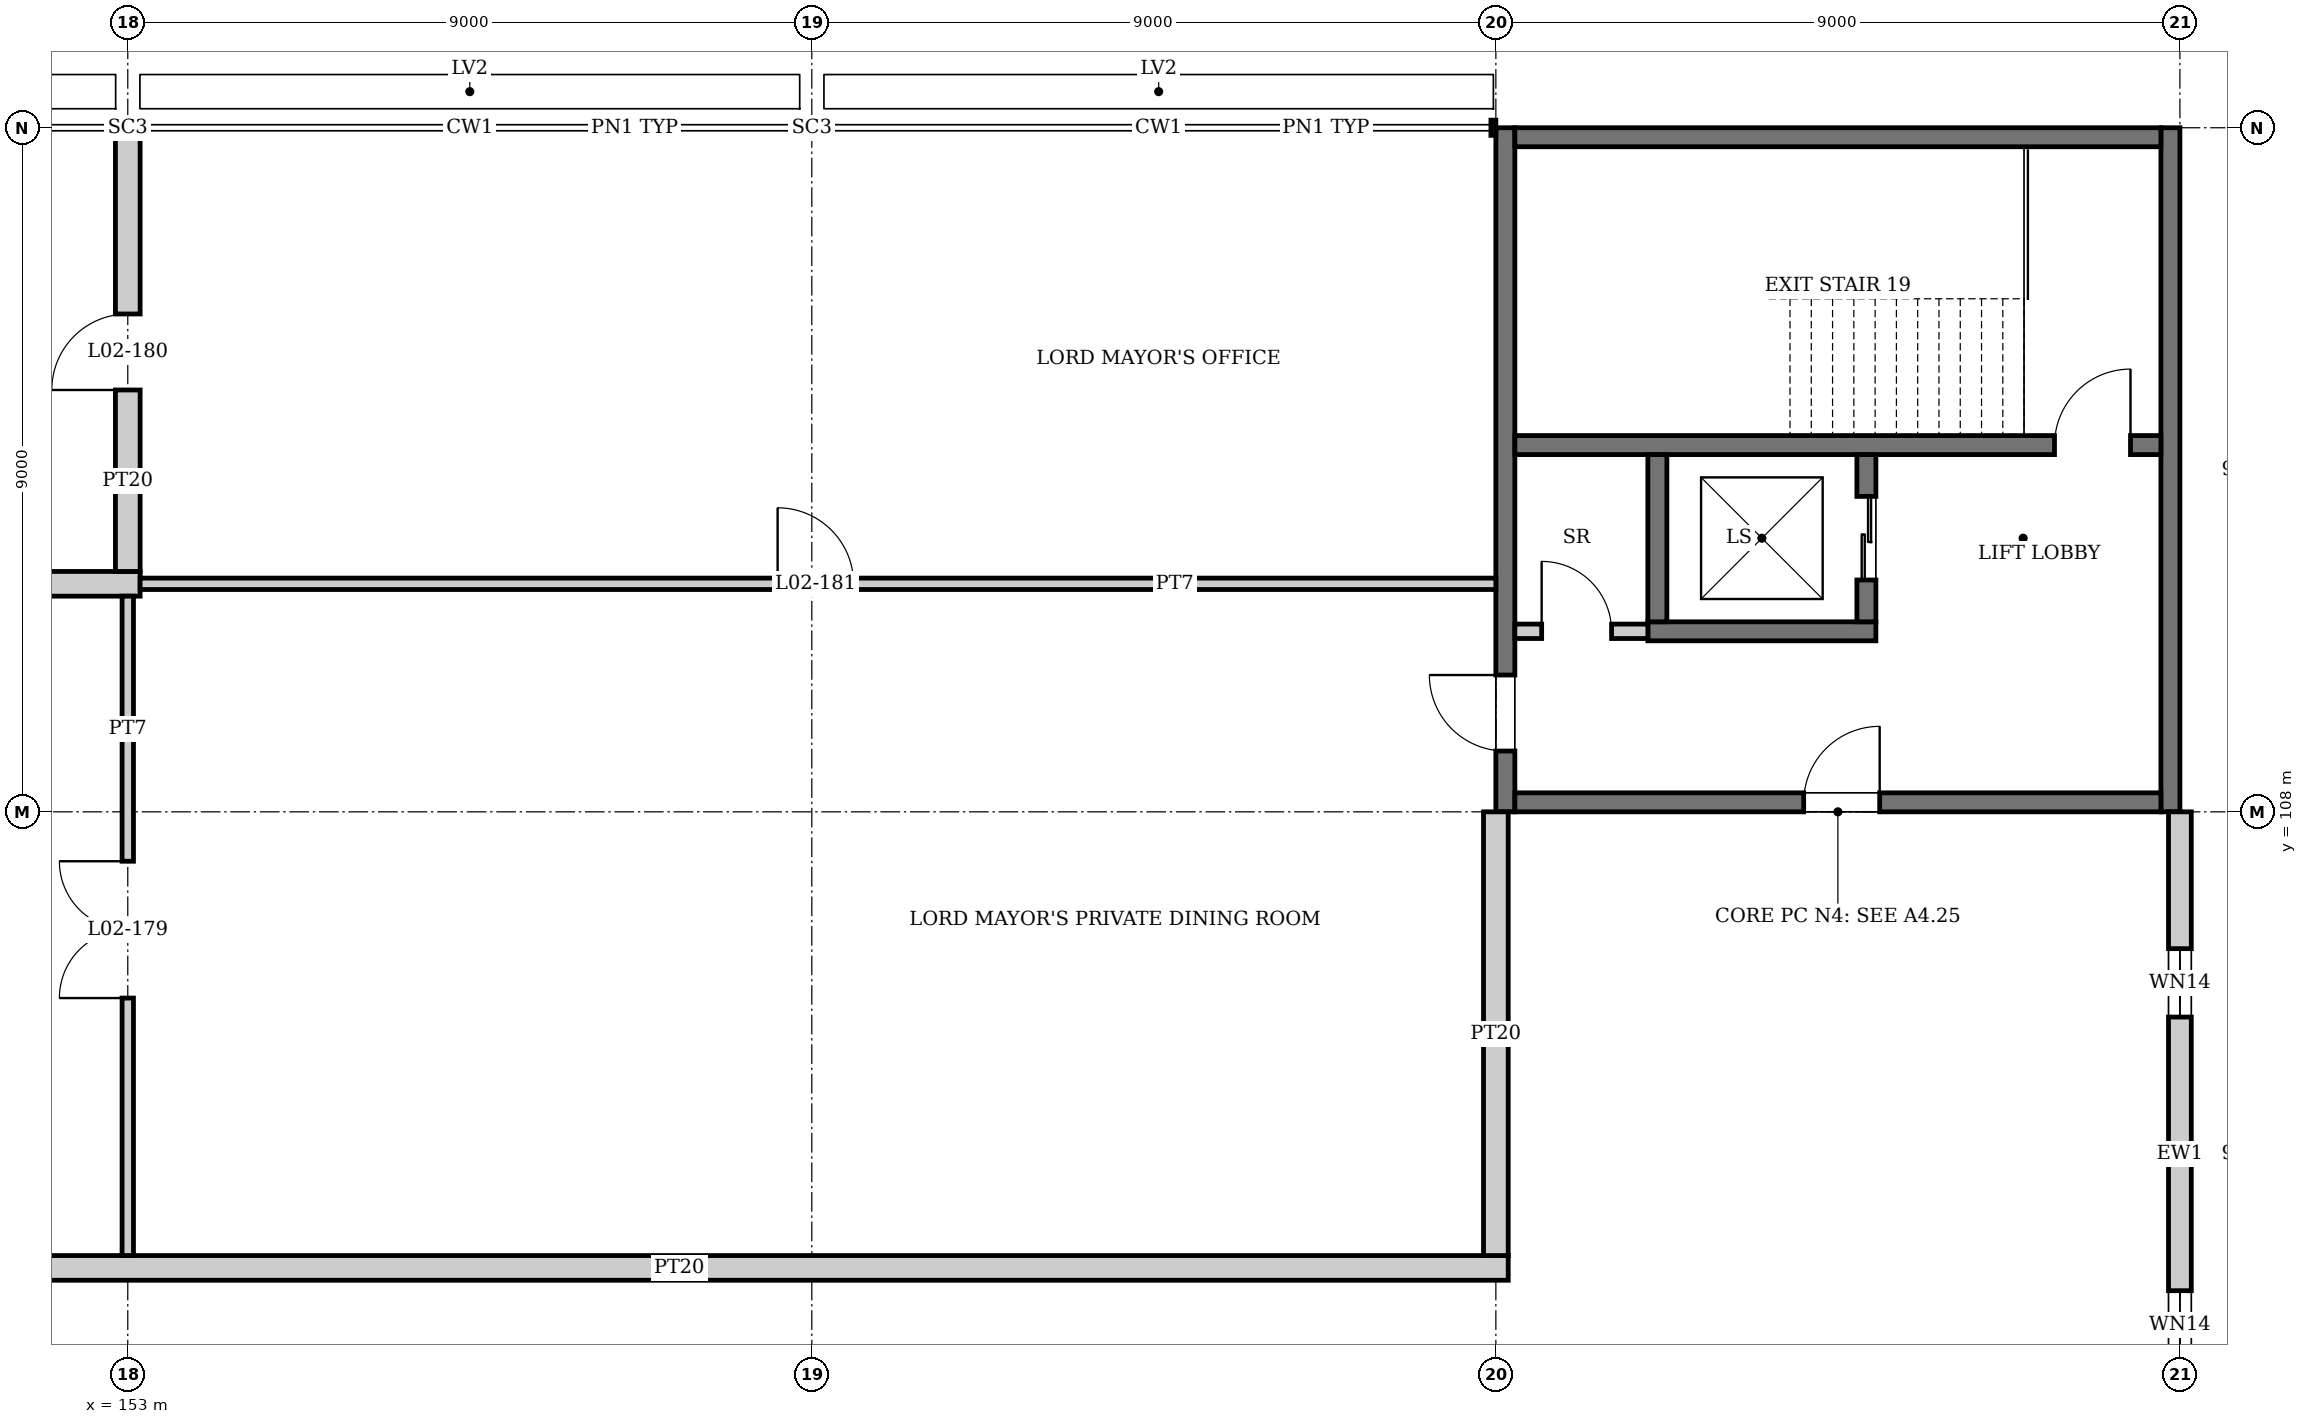
"""IFC4 building model, lengths in metres.
Left out: names, types, materials, properties, quantities, classifications, styles, units other than length and angle.
Written with IfcOpenShell. Run it as: python <this file> out.ifc"""

import sys

from ifc_helpers import new_model, si_unit, direction, frame, frame_2d, origin, origin_2d, place, context, subcontext, project, spatial, rectangle, i_section, extrude, element, fill, save


model = new_model("IFC4")
c1 = context("Model", 3, precision=1e-05, world=origin(), true_north=direction((0.0, 1.0)))
c2 = subcontext(c1, "Body", "Model", "MODEL_VIEW")
j1 = project(units=[si_unit("LENGTHUNIT", "METRE"), si_unit("PLANEANGLEUNIT", "RADIAN")], contexts=[c1])
p1 = place(None, origin())
s1 = spatial("IfcSite", under=j1, at=p1, CompositionType="ELEMENT")
p2 = place(p1, origin())
s2 = spatial("IfcBuilding", under=s1, at=p2, CompositionType="ELEMENT")
p3 = place(p2, frame((0.0, 0.0, 10.5)))
s3 = spatial("IfcBuildingStorey", under=s2, at=p3, CompositionType="ELEMENT", Elevation=10.5)
for number, where, z_axis, x_axis in (
    (1, (153.0, 117.0, 0.0), (0.0, 0.0, 1.0), (0.0, 1.0, 0.0)),
    (2, (162.0, 117.0, 0.0), (0.0, 0.0, 1.0), (0.0, 1.0, 0.0)),
):
    element("IfcColumn", number, at=place(p3, frame(where, z_axis=z_axis, x_axis=x_axis)), inside=s3, PredefinedType="COLUMN", context=c2, shape_type="SweptSolid", body=[
        extrude(i_section(OverallWidth=0.254, OverallDepth=0.254, WebThickness=0.009, FlangeThickness=0.014, at=origin_2d()), origin(), (0.0, 0.0, 1.0), 4.5),
    ])
p4 = place(p3, frame((171.125, 108.0, 0.0), z_axis=(0.0, 0.0, 1.0), x_axis=(0.0, 1.0, 0.0)))
e3 = element("IfcWall", 3, at=p4, inside=s3, PredefinedType="SHEAR", context=c2, shape_type="SweptSolid", body=[
    extrude(rectangle(XDim=9.0, YDim=0.25, at=frame_2d((4.5, 0.0))), origin(), (0.0, 0.0, 1.0), 4.35),
])
p5 = place(p4, frame((0.8, 0.0, 0.0)))
e4 = element("IfcOpeningElement", 4, at=p5, cuts=e3, PredefinedType="OPENING", context=c2, shape_type="SweptSolid", body=[
    extrude(rectangle(XDim=1.0, YDim=2.1, at=frame_2d((0.5, 1.05))), frame((0.0, 0.135, 0.0), z_axis=(0.0, -1.0, 0.0), x_axis=(1.0, 0.0, 0.0)), (0.0, 0.0, 1.0), 0.27),
])
p6 = place(p3, frame((179.875, 108.0, 0.0), z_axis=(0.0, 0.0, 1.0), x_axis=(0.0, 1.0, 0.0)))
e5 = element("IfcWall", 5, at=p6, inside=s3, PredefinedType="SHEAR", context=c2, shape_type="SweptSolid", body=[
    extrude(rectangle(XDim=9.0, YDim=0.25, at=frame_2d((4.5, 0.0))), origin(), (0.0, 0.0, 1.0), 4.35),
])
p7 = place(p3, frame((171.25, 108.125, 0.0), z_axis=(0.0, 0.0, 1.0), x_axis=(1.0, 0.0, 0.0)))
e6 = element("IfcWall", 6, at=p7, inside=s3, PredefinedType="SHEAR", context=c2, shape_type="SweptSolid", body=[
    extrude(rectangle(XDim=8.5, YDim=0.25, at=frame_2d((4.25, 0.0))), origin(), (0.0, 0.0, 1.0), 4.35),
])
p8 = place(p7, frame((3.8, 0.0, 0.0)))
e7 = element("IfcOpeningElement", 7, at=p8, cuts=e6, PredefinedType="OPENING", context=c2, shape_type="SweptSolid", body=[
    extrude(rectangle(XDim=1.0, YDim=2.1, at=frame_2d((0.5, 1.05))), frame((0.0, 0.135, 0.0), z_axis=(0.0, -1.0, 0.0), x_axis=(1.0, 0.0, 0.0)), (0.0, 0.0, 1.0), 0.27),
])
p9 = place(p3, frame((171.25, 116.875, 0.0), z_axis=(0.0, 0.0, 1.0), x_axis=(1.0, 0.0, 0.0)))
e8 = element("IfcWall", 8, at=p9, inside=s3, PredefinedType="SHEAR", context=c2, shape_type="SweptSolid", body=[
    extrude(rectangle(XDim=8.5, YDim=0.25, at=frame_2d((4.25, 0.0))), origin(), (0.0, 0.0, 1.0), 4.35),
])
p10 = place(p3, frame((180.0, 99.127, 0.0), z_axis=(0.0, 0.0, 1.0), x_axis=(0.0, 1.0, 0.0)))
e9 = element("IfcWall", 9, at=p10, inside=s3, PredefinedType="SOLIDWALL", context=c2, shape_type="SweptSolid", body=[
    extrude(rectangle(XDim=8.873, YDim=0.3, at=frame_2d((4.437, 0.0))), origin(), (0.0, 0.0, 1.0), 3.991),
])
p11 = place(p10, frame((1.673, 0.0, 0.6)))
e10 = element("IfcOpeningElement", 10, at=p11, cuts=e9, PredefinedType="OPENING", context=c2, shape_type="SweptSolid", body=[
    extrude(rectangle(XDim=0.9, YDim=2.7, at=frame_2d((0.45, 1.35))), frame((0.0, 0.16, 0.0), z_axis=(0.0, -1.0, 0.0), x_axis=(1.0, 0.0, 0.0)), (0.0, 0.0, 1.0), 0.32),
])
p12 = place(p10, frame((6.173, 0.0, 0.6)))
e11 = element("IfcOpeningElement", 11, at=p12, cuts=e9, PredefinedType="OPENING", context=c2, shape_type="SweptSolid", body=[
    extrude(rectangle(XDim=0.9, YDim=2.7, at=frame_2d((0.45, 1.35))), frame((0.0, 0.16, 0.0), z_axis=(0.0, -1.0, 0.0), x_axis=(1.0, 0.0, 0.0)), (0.0, 0.0, 1.0), 0.32),
])
p13 = place(p3, frame((179.75, 112.825, 0.0), z_axis=(0.0, 0.0, 1.0), x_axis=(-1.0, 0.0, 0.0)))
e12 = element("IfcWall", 12, at=p13, inside=s3, PredefinedType="SOLIDWALL", context=c2, shape_type="SweptSolid", body=[
    extrude(rectangle(XDim=8.5, YDim=0.25, at=frame_2d((4.25, 0.0))), origin(), (0.0, 0.0, 1.0), 4.35),
])
p14 = place(p13, frame((0.4, 0.0, 0.0)))
e13 = element("IfcOpeningElement", 13, at=p14, cuts=e12, PredefinedType="OPENING", context=c2, shape_type="SweptSolid", body=[
    extrude(rectangle(XDim=1.0, YDim=2.1, at=frame_2d((0.5, 1.05))), frame((0.0, 0.135, 0.0), z_axis=(0.0, -1.0, 0.0), x_axis=(1.0, 0.0, 0.0)), (0.0, 0.0, 1.0), 0.27),
])
p15 = place(p3, frame((173.0, 110.375, 0.0), z_axis=(0.0, 0.0, 1.0), x_axis=(1.0, 0.0, 0.0)))
e14 = element("IfcWall", 14, at=p15, inside=s3, PredefinedType="SOLIDWALL", context=c2, shape_type="SweptSolid", body=[
    extrude(rectangle(XDim=3.0, YDim=0.25, at=frame_2d((1.5, 0.0))), origin(), (0.0, 0.0, 1.0), 4.35),
])
p16 = place(p3, frame((173.125, 110.5, 0.0), z_axis=(0.0, 0.0, 1.0), x_axis=(0.0, 1.0, 0.0)))
e15 = element("IfcWall", 15, at=p16, inside=s3, PredefinedType="SOLIDWALL", context=c2, shape_type="SweptSolid", body=[
    extrude(rectangle(XDim=2.2, YDim=0.25, at=frame_2d((1.1, 0.0))), origin(), (0.0, 0.0, 1.0), 4.35),
])
p17 = place(p3, frame((175.875, 110.5, 0.0), z_axis=(0.0, 0.0, 1.0), x_axis=(0.0, 1.0, 0.0)))
e16 = element("IfcWall", 16, at=p17, inside=s3, PredefinedType="SOLIDWALL", context=c2, shape_type="SweptSolid", body=[
    extrude(rectangle(XDim=2.2, YDim=0.25, at=frame_2d((1.1, 0.0))), origin(), (0.0, 0.0, 1.0), 4.35),
])
p18 = place(p17, frame((0.55, 0.0, 0.0)))
e17 = element("IfcOpeningElement", 17, at=p18, cuts=e16, PredefinedType="OPENING", context=c2, shape_type="SweptSolid", body=[
    extrude(rectangle(XDim=1.1, YDim=2.1, at=frame_2d((0.55, 1.05))), frame((0.0, 0.135, 0.0), z_axis=(0.0, -1.0, 0.0), x_axis=(1.0, 0.0, 0.0)), (0.0, 0.0, 1.0), 0.27),
])
p19 = place(p3, frame((143.837, 102.0, 0.0), z_axis=(0.0, 0.0, 1.0), x_axis=(1.0, 0.0, 0.0)))
e18 = element("IfcWall", 18, at=p19, inside=s3, PredefinedType="PARTITIONING", context=c2, shape_type="SweptSolid", body=[
    extrude(rectangle(XDim=27.325, YDim=0.325, at=frame_2d((13.663, 0.0))), origin(), (0.0, 0.0, 1.0), 3.65),
])
p20 = place(p19, frame((3.712, 0.0, 0.0)))
e19 = element("IfcOpeningElement", 19, at=p20, cuts=e18, PredefinedType="OPENING", context=c2, shape_type="SweptSolid", body=[
    extrude(rectangle(XDim=1.8, YDim=2.4, at=frame_2d((0.9, 1.2))), frame((0.0, 0.172, 0.0), z_axis=(0.0, -1.0, 0.0), x_axis=(1.0, 0.0, 0.0)), (0.0, 0.0, 1.0), 0.345),
])
p21 = place(p3, frame((171.25, 110.375, 0.0), z_axis=(0.0, 0.0, 1.0), x_axis=(1.0, 0.0, 0.0)))
e20 = element("IfcWall", 20, at=p21, inside=s3, PredefinedType="PARTITIONING", context=c2, shape_type="SweptSolid", body=[
    extrude(rectangle(XDim=1.75, YDim=0.19, at=frame_2d((0.875, 0.0))), origin(), (0.0, 0.0, 1.0), 4.35),
])
p22 = place(p21, frame((0.353, 0.0, 0.0)))
e21 = element("IfcOpeningElement", 21, at=p22, cuts=e20, PredefinedType="OPENING", context=c2, shape_type="SweptSolid", body=[
    extrude(rectangle(XDim=0.92, YDim=2.1, at=frame_2d((0.46, 1.05))), frame((0.0, 0.105, 0.0), z_axis=(0.0, -1.0, 0.0), x_axis=(1.0, 0.0, 0.0)), (0.0, 0.0, 1.0), 0.21),
])
p23 = place(p3, frame((144.0, 111.0, 0.0), z_axis=(0.0, 0.0, 1.0), x_axis=(1.0, 0.0, 0.0)))
e22 = element("IfcWall", 22, at=p23, inside=s3, PredefinedType="PARTITIONING", context=c2, shape_type="SweptSolid", body=[
    extrude(rectangle(XDim=9.163, YDim=0.325, at=frame_2d((4.581, 0.0))), origin(), (0.0, 0.0, 1.0), 3.65),
])
p24 = place(p23, frame((4.05, 0.0, 0.0)))
e23 = element("IfcOpeningElement", 23, at=p24, cuts=e22, PredefinedType="OPENING", context=c2, shape_type="SweptSolid", body=[
    extrude(rectangle(XDim=1.0, YDim=2.1, at=frame_2d((0.5, 1.05))), frame((0.0, 0.172, 0.0), z_axis=(0.0, -1.0, 0.0), x_axis=(1.0, 0.0, 0.0)), (0.0, 0.0, 1.0), 0.345),
])
p25 = place(p3, frame((153.163, 111.0, 0.0), z_axis=(0.0, 0.0, 1.0), x_axis=(1.0, 0.0, 0.0)))
e24 = element("IfcWall", 24, at=p25, inside=s3, PredefinedType="PARTITIONING", context=c2, shape_type="SweptSolid", body=[
    extrude(rectangle(XDim=17.837, YDim=0.15, at=frame_2d((8.919, 0.0))), origin(), (0.0, 0.0, 1.0), 3.65),
])
p26 = place(p25, frame((8.387, 0.0, 0.0)))
e25 = element("IfcOpeningElement", 25, at=p26, cuts=e24, PredefinedType="OPENING", context=c2, shape_type="SweptSolid", body=[
    extrude(rectangle(XDim=1.0, YDim=2.1, at=frame_2d((0.5, 1.05))), frame((0.0, 0.085, 0.0), z_axis=(0.0, -1.0, 0.0), x_axis=(1.0, 0.0, 0.0)), (0.0, 0.0, 1.0), 0.17),
])
p27 = place(p3, frame((153.0, 102.163, 0.0), z_axis=(0.0, 0.0, 1.0), x_axis=(0.0, 1.0, 0.0)))
e26 = element("IfcWall", 26, at=p27, inside=s3, PredefinedType="PARTITIONING", context=c2, shape_type="SweptSolid", body=[
    extrude(rectangle(XDim=8.675, YDim=0.15, at=frame_2d((4.337, 0.0))), origin(), (0.0, 0.0, 1.0), 3.65),
])
p28 = place(p27, frame((3.387, 0.0, 0.0)))
e27 = element("IfcOpeningElement", 27, at=p28, cuts=e26, PredefinedType="OPENING", context=c2, shape_type="SweptSolid", body=[
    extrude(rectangle(XDim=1.8, YDim=2.4, at=frame_2d((0.9, 1.2))), frame((0.0, 0.085, 0.0), z_axis=(0.0, -1.0, 0.0), x_axis=(1.0, 0.0, 0.0)), (0.0, 0.0, 1.0), 0.17),
])
p29 = place(p3, frame((153.0, 111.163, 0.0), z_axis=(0.0, 0.0, 1.0), x_axis=(0.0, 1.0, 0.0)))
e28 = element("IfcWall", 28, at=p29, inside=s3, PredefinedType="PARTITIONING", context=c2, shape_type="SweptSolid", body=[
    extrude(rectangle(XDim=5.71, YDim=0.325, at=frame_2d((2.855, 0.0))), origin(), (0.0, 0.0, 1.0), 3.65),
])
p30 = place(p29, frame((2.387, 0.0, 0.0)))
e29 = element("IfcOpeningElement", 29, at=p30, cuts=e28, PredefinedType="OPENING", context=c2, shape_type="SweptSolid", body=[
    extrude(rectangle(XDim=1.0, YDim=2.1, at=frame_2d((0.5, 1.05))), frame((0.0, 0.172, 0.0), z_axis=(0.0, -1.0, 0.0), x_axis=(1.0, 0.0, 0.0)), (0.0, 0.0, 1.0), 0.345),
])
p31 = place(p3, frame((171.0, 102.163, 0.0), z_axis=(0.0, 0.0, 1.0), x_axis=(0.0, 1.0, 0.0)))
e30 = element("IfcWall", 30, at=p31, inside=s3, PredefinedType="PARTITIONING", context=c2, shape_type="SweptSolid", body=[
    extrude(rectangle(XDim=5.837, YDim=0.325, at=frame_2d((2.919, 0.0))), origin(), (0.0, 0.0, 1.0), 3.998),
])
p32 = place(p11, origin())
e31 = element("IfcWindow", 31, at=p32, inside=s3, PartitioningType="SINGLE_PANEL", PredefinedType="WINDOW", context=c2, shape_type="SweptSolid", body=[
    extrude(rectangle(XDim=0.9, YDim=2.7, at=frame_2d((0.45, 1.35))), frame((0.0, 0.03, 0.0), z_axis=(0.0, -1.0, 0.0), x_axis=(1.0, 0.0, 0.0)), (0.0, 0.0, 1.0), 0.06),
])
fill(e10, e31)
p33 = place(p12, origin())
e32 = element("IfcWindow", 32, at=p33, inside=s3, PartitioningType="SINGLE_PANEL", PredefinedType="WINDOW", context=c2, shape_type="SweptSolid", body=[
    extrude(rectangle(XDim=0.9, YDim=2.7, at=frame_2d((0.45, 1.35))), frame((0.0, 0.03, 0.0), z_axis=(0.0, -1.0, 0.0), x_axis=(1.0, 0.0, 0.0)), (0.0, 0.0, 1.0), 0.06),
])
fill(e11, e32)
p34 = place(p18, origin())
e33 = element("IfcDoor", 33, at=p34, inside=s3, OperationType="DOUBLE_DOOR_SLIDING", PredefinedType="DOOR", context=c2, shape_type="SweptSolid", body=[
    extrude(rectangle(XDim=1.1, YDim=2.1, at=frame_2d((0.55, 1.05))), frame((0.0, 0.025, 0.0), z_axis=(0.0, -1.0, 0.0), x_axis=(1.0, 0.0, 0.0)), (0.0, 0.0, 1.0), 0.05),
])
fill(e17, e33)
p35 = place(p14, frame((1.0, 0.0, 0.0), z_axis=(0.0, 0.0, 1.0), x_axis=(-1.0, 0.0, 0.0)))
e34 = element("IfcDoor", 34, at=p35, inside=s3, OperationType="SINGLE_SWING_RIGHT", PredefinedType="DOOR", context=c2, shape_type="SweptSolid", body=[
    extrude(rectangle(XDim=1.0, YDim=2.1, at=frame_2d((0.5, 1.05))), frame((0.0, 0.025, 0.0), z_axis=(0.0, -1.0, 0.0), x_axis=(1.0, 0.0, 0.0)), (0.0, 0.0, 1.0), 0.05),
])
fill(e13, e34)
p36 = place(p22, origin())
e35 = element("IfcDoor", 35, at=p36, inside=s3, OperationType="SINGLE_SWING_LEFT", PredefinedType="DOOR", context=c2, shape_type="SweptSolid", body=[
    extrude(rectangle(XDim=0.92, YDim=2.1, at=frame_2d((0.46, 1.05))), frame((0.0, 0.025, 0.0), z_axis=(0.0, -1.0, 0.0), x_axis=(1.0, 0.0, 0.0)), (0.0, 0.0, 1.0), 0.05),
])
fill(e21, e35)
p37 = place(p8, origin())
e36 = element("IfcDoor", 36, at=p37, inside=s3, OperationType="SINGLE_SWING_RIGHT", PredefinedType="DOOR", context=c2, shape_type="SweptSolid", body=[
    extrude(rectangle(XDim=1.0, YDim=2.1, at=frame_2d((0.5, 1.05))), frame((0.0, 0.025, 0.0), z_axis=(0.0, -1.0, 0.0), x_axis=(1.0, 0.0, 0.0)), (0.0, 0.0, 1.0), 0.05),
])
fill(e7, e36)
p38 = place(p5, origin())
e37 = element("IfcDoor", 37, at=p38, inside=s3, OperationType="SINGLE_SWING_RIGHT", PredefinedType="DOOR", context=c2, shape_type="SweptSolid", body=[
    extrude(rectangle(XDim=1.0, YDim=2.1, at=frame_2d((0.5, 1.05))), frame((0.0, 0.025, 0.0), z_axis=(0.0, -1.0, 0.0), x_axis=(1.0, 0.0, 0.0)), (0.0, 0.0, 1.0), 0.05),
])
fill(e4, e37)
p39 = place(p28, origin())
e38 = element("IfcDoor", 38, at=p39, inside=s3, OperationType="DOUBLE_DOOR_SINGLE_SWING", PredefinedType="DOOR", context=c2, shape_type="SweptSolid", body=[
    extrude(rectangle(XDim=1.8, YDim=2.4, at=frame_2d((0.9, 1.2))), frame((0.0, 0.025, 0.0), z_axis=(0.0, -1.0, 0.0), x_axis=(1.0, 0.0, 0.0)), (0.0, 0.0, 1.0), 0.05),
])
fill(e27, e38)
p40 = place(p30, origin())
e39 = element("IfcDoor", 39, at=p40, inside=s3, OperationType="SINGLE_SWING_LEFT", PredefinedType="DOOR", context=c2, shape_type="SweptSolid", body=[
    extrude(rectangle(XDim=1.0, YDim=2.1, at=frame_2d((0.5, 1.05))), frame((0.0, 0.025, 0.0), z_axis=(0.0, -1.0, 0.0), x_axis=(1.0, 0.0, 0.0)), (0.0, 0.0, 1.0), 0.05),
])
fill(e29, e39)
p41 = place(p26, origin())
e40 = element("IfcDoor", 40, at=p41, inside=s3, OperationType="SINGLE_SWING_LEFT", PredefinedType="DOOR", context=c2, shape_type="SweptSolid", body=[
    extrude(rectangle(XDim=1.0, YDim=2.1, at=frame_2d((0.5, 1.05))), frame((0.0, 0.025, 0.0), z_axis=(0.0, -1.0, 0.0), x_axis=(1.0, 0.0, 0.0)), (0.0, 0.0, 1.0), 0.05),
])
fill(e25, e40)
save(model, sys.argv[1])
